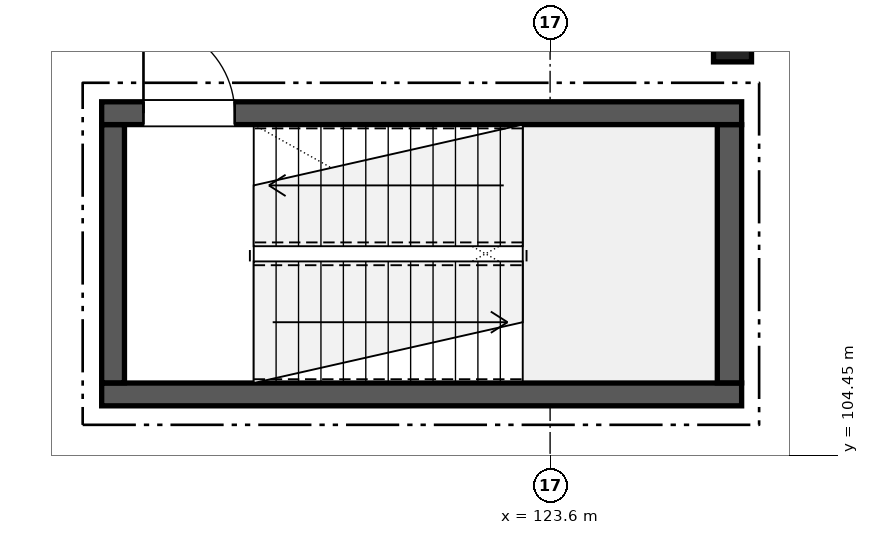
"""IFC4 building model, lengths in metres.
Left out: names, types, materials, properties, quantities, classifications, styles, units other than length and angle.
Written with IfcOpenShell. Run it as: python <this file> out.ifc"""

import sys

from ifc_helpers import new_model, si_unit, direction, frame, frame_2d, origin, origin_2d, place, context, subcontext, project, spatial, rectangle, extrude, element, fill, save


model = new_model("IFC4")
c1 = context("Model", 3, precision=1e-05, world=origin(), true_north=direction((0.0, 1.0)))
c2 = subcontext(c1, "Body", "Model", "MODEL_VIEW")
j1 = project(units=[si_unit("LENGTHUNIT", "METRE"), si_unit("PLANEANGLEUNIT", "RADIAN")], contexts=[c1])
p1 = place(None, origin())
s1 = spatial("IfcSite", under=j1, at=p1, CompositionType="ELEMENT")
p2 = place(p1, origin())
s2 = spatial("IfcBuilding", under=s1, at=p2, CompositionType="ELEMENT")
p3 = place(p2, frame((0.0, 0.0, 5.1)))
s3 = spatial("IfcBuildingStorey", under=s2, at=p3, CompositionType="ELEMENT", Elevation=5.1)
p4 = place(p3, frame((126.0, 110.0, 0.0), z_axis=(0.0, 0.0, 1.0), x_axis=(1.0, 0.0, 0.0)))
e1 = element("IfcColumn", 1, at=p4, inside=s3, PredefinedType="COLUMN", context=c2, shape_type="SweptSolid", body=[
    extrude(rectangle(XDim=0.5, YDim=0.75, at=origin_2d()), origin(), (0.0, 0.0, 1.0), 4.42),
])
p5 = place(p3, frame((117.7, 105.25, 0.0), z_axis=(0.0, 0.0, 1.0), x_axis=(1.0, 0.0, 0.0)))
e2 = element("IfcWall", 2, at=p5, inside=s3, PredefinedType="SHEAR", context=c2, shape_type="SweptSolid", body=[
    extrude(rectangle(XDim=8.42, YDim=0.3, at=frame_2d((4.21, 0.0))), origin(), (0.0, 0.0, 1.0), 4.145),
])
p6 = place(p3, frame((117.7, 108.95, 0.0), z_axis=(0.0, 0.0, 1.0), x_axis=(1.0, 0.0, 0.0)))
e3 = element("IfcWall", 3, at=p6, inside=s3, PredefinedType="SHEAR", context=c2, shape_type="SweptSolid", body=[
    extrude(rectangle(XDim=8.42, YDim=0.3, at=frame_2d((4.21, 0.0))), origin(), (0.0, 0.0, 1.0), 4.145),
])
p7 = place(p6, frame((0.55, 0.0, 0.0)))
e4 = element("IfcOpeningElement", 4, at=p7, cuts=e3, PredefinedType="OPENING", context=c2, shape_type="SweptSolid", body=[
    extrude(rectangle(XDim=1.2, YDim=2.2, at=frame_2d((0.6, 1.1))), frame((0.0, 0.16, 0.0), z_axis=(0.0, -1.0, 0.0), x_axis=(1.0, 0.0, 0.0)), (0.0, 0.0, 1.0), 0.32),
])
p8 = place(p3, frame((117.85, 105.402, 0.0), z_axis=(0.0, 0.0, 1.0), x_axis=(0.0, 1.0, 0.0)))
e5 = element("IfcWall", 5, at=p8, inside=s3, PredefinedType="SHEAR", context=c2, shape_type="SweptSolid", body=[
    extrude(rectangle(XDim=3.396, YDim=0.3, at=frame_2d((1.698, 0.0))), origin(), (0.0, 0.0, 1.0), 4.145),
])
p9 = place(p3, frame((125.96, 105.402, 0.0), z_axis=(0.0, 0.0, 1.0), x_axis=(0.0, 1.0, 0.0)))
e6 = element("IfcWall", 6, at=p9, inside=s3, PredefinedType="SHEAR", context=c2, shape_type="SweptSolid", body=[
    extrude(rectangle(XDim=3.396, YDim=0.32, at=frame_2d((1.698, 0.0))), origin(), (0.0, 0.0, 1.0), 4.145),
])
p10 = place(p7, origin())
e7 = element("IfcDoor", 7, at=p10, inside=s3, OperationType="SINGLE_SWING_LEFT", PredefinedType="DOOR", context=c2, shape_type="SweptSolid", body=[
    extrude(rectangle(XDim=1.2, YDim=2.2, at=frame_2d((0.6, 1.1))), frame((0.0, 0.025, 0.0), z_axis=(0.0, -1.0, 0.0), x_axis=(1.0, 0.0, 0.0)), (0.0, 0.0, 1.0), 0.05),
])
fill(e4, e7)
save(model, sys.argv[1])
